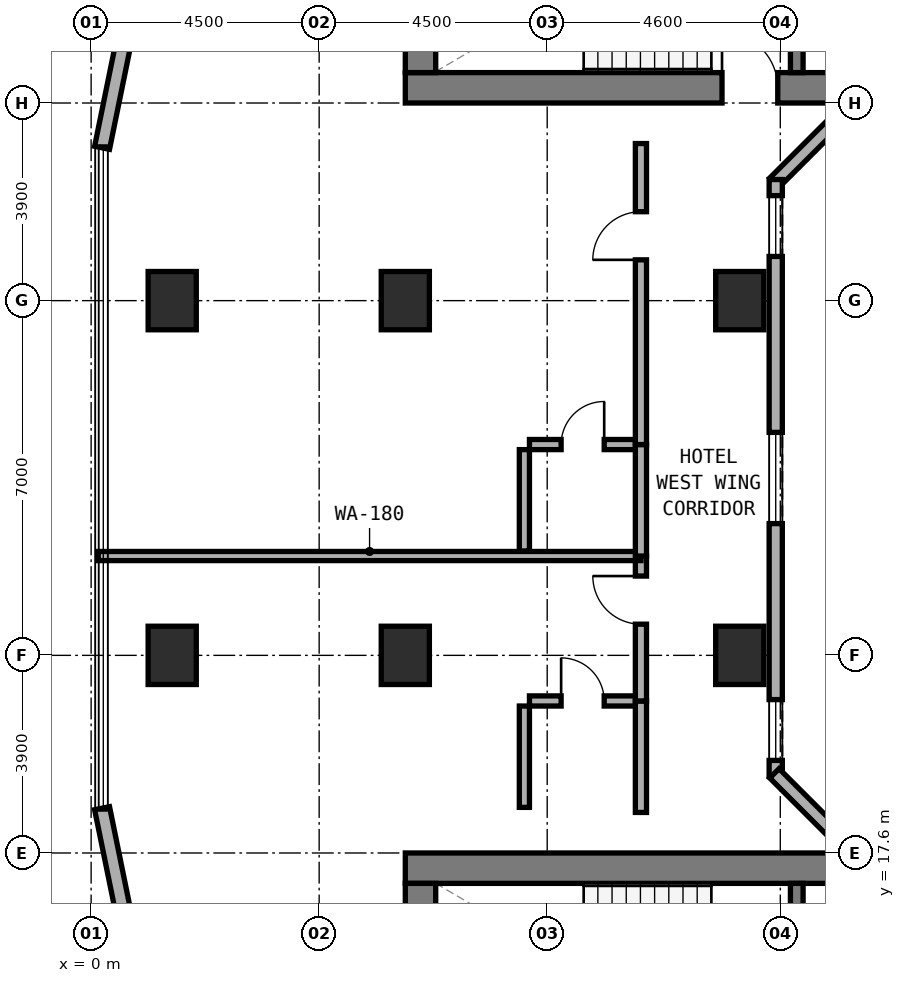
"""IFC4 building model, lengths in metres.
Left out: names, types, materials, properties, quantities, classifications, styles, units other than length and angle.
Written with IfcOpenShell. Run it as: python <this file> out.ifc"""

import sys

from ifc_helpers import new_model, si_unit, direction, frame, frame_2d, origin, origin_2d, place, context, subcontext, project, spatial, rectangle, extrude, element, fill, save


model = new_model("IFC4")
c1 = context("Model", 3, precision=1e-05, world=origin(), true_north=direction((0.0, 1.0)))
c2 = subcontext(c1, "Body", "Model", "MODEL_VIEW")
j1 = project(units=[si_unit("LENGTHUNIT", "METRE"), si_unit("PLANEANGLEUNIT", "RADIAN")], contexts=[c1])
p1 = place(None, origin())
s1 = spatial("IfcSite", under=j1, at=p1, CompositionType="ELEMENT")
p2 = place(p1, origin())
s2 = spatial("IfcBuilding", under=s1, at=p2, CompositionType="ELEMENT")
p3 = place(p2, frame((0.0, 0.0, 24.0)))
s3 = spatial("IfcBuildingStorey", under=s2, at=p3, CompositionType="ELEMENT", Elevation=24.0)
p4 = place(p3, frame((6.2, 32.7, 0.0), z_axis=(0.0, 0.0, 1.0), x_axis=(1.0, 0.0, 0.0)))
e1 = element("IfcWall", 1, at=p4, inside=s3, PredefinedType="SHEAR", context=c2, shape_type="SweptSolid", body=[
    extrude(rectangle(XDim=24.8, YDim=0.6, at=frame_2d((12.4, 0.0))), origin(), (0.0, 0.0, 1.0), 3.5),
])
p5 = place(p4, frame((6.25, 0.0, 0.0)))
e2 = element("IfcOpeningElement", 2, at=p5, cuts=e1, PredefinedType="OPENING", context=c2, shape_type="SweptSolid", body=[
    extrude(rectangle(XDim=1.1, YDim=2.15, at=frame_2d((0.55, 1.075))), frame((0.0, 0.31, 0.0), z_axis=(0.0, -1.0, 0.0), x_axis=(1.0, 0.0, 0.0)), (0.0, 0.0, 1.0), 0.62),
])
p6 = place(p3, frame((6.5, 33.0, 0.0), z_axis=(0.0, 0.0, 1.0), x_axis=(0.0, 1.0, 0.0)))
e3 = element("IfcWall", 3, at=p6, inside=s3, PredefinedType="SHEAR", context=c2, shape_type="SweptSolid", body=[
    extrude(rectangle(XDim=3.16, YDim=0.6, at=frame_2d((1.58, 0.0))), origin(), (0.0, 0.0, 1.0), 3.5),
])
p7 = place(p3, frame((13.925, 33.0, 0.0), z_axis=(0.0, 0.0, 1.0), x_axis=(0.0, 1.0, 0.0)))
e4 = element("IfcWall", 4, at=p7, inside=s3, PredefinedType="STANDARD", context=c2, shape_type="SweptSolid", body=[
    extrude(rectangle(XDim=3.16, YDim=0.25, at=frame_2d((1.58, 0.0))), origin(), (0.0, 0.0, 1.0), 3.22),
])
p8 = place(p7, frame((0.98, 0.0, 0.0)))
e5 = element("IfcOpeningElement", 5, at=p8, cuts=e4, PredefinedType="OPENING", context=c2, shape_type="SweptSolid", body=[
    extrude(rectangle(XDim=1.1, YDim=2.15, at=frame_2d((0.55, 1.075))), frame((0.0, 0.135, 0.0), z_axis=(0.0, -1.0, 0.0), x_axis=(1.0, 0.0, 0.0)), (0.0, 0.0, 1.0), 0.27),
])
p9 = place(p3, frame((6.2, 17.3, 0.0), z_axis=(0.0, 0.0, 1.0), x_axis=(1.0, 0.0, 0.0)))
e6 = element("IfcWall", 6, at=p9, inside=s3, PredefinedType="SHEAR", context=c2, shape_type="SweptSolid", body=[
    extrude(rectangle(XDim=24.8, YDim=0.6, at=frame_2d((12.4, 0.0))), origin(), (0.0, 0.0, 1.0), 3.5),
])
p10 = place(p3, frame((6.5, 13.84, 0.0), z_axis=(0.0, 0.0, 1.0), x_axis=(0.0, 1.0, 0.0)))
e7 = element("IfcWall", 7, at=p10, inside=s3, PredefinedType="SHEAR", context=c2, shape_type="SweptSolid", body=[
    extrude(rectangle(XDim=3.16, YDim=0.6, at=frame_2d((1.58, 0.0))), origin(), (0.0, 0.0, 1.0), 3.5),
])
p11 = place(p3, frame((13.925, 13.84, 0.0), z_axis=(0.0, 0.0, 1.0), x_axis=(0.0, 1.0, 0.0)))
e8 = element("IfcWall", 8, at=p11, inside=s3, PredefinedType="STANDARD", context=c2, shape_type="SweptSolid", body=[
    extrude(rectangle(XDim=3.16, YDim=0.25, at=frame_2d((1.58, 0.0))), origin(), (0.0, 0.0, 1.0), 3.22),
])
p12 = place(p11, frame((0.98, 0.0, 0.0)))
e9 = element("IfcOpeningElement", 9, at=p12, cuts=e8, PredefinedType="OPENING", context=c2, shape_type="SweptSolid", body=[
    extrude(rectangle(XDim=1.1, YDim=2.15, at=frame_2d((0.55, 1.075))), frame((0.0, 0.135, 0.0), z_axis=(0.0, -1.0, 0.0), x_axis=(1.0, 0.0, 0.0)), (0.0, 0.0, 1.0), 0.27),
])
for number, where, z_axis, x_axis in (
    (10, (6.2, 21.5, 0.0), (0.0, 0.0, 1.0), (1.0, 0.0, 0.0)),
    (11, (6.2, 28.5, 0.0), (0.0, 0.0, 1.0), (1.0, 0.0, 0.0)),
    (12, (12.8, 21.5, 0.0), (0.0, 0.0, 1.0), (1.0, 0.0, 0.0)),
    (13, (12.8, 28.5, 0.0), (0.0, 0.0, 1.0), (1.0, 0.0, 0.0)),
    (14, (1.6, 21.5, 0.0), (0.0, 0.0, 1.0), (1.0, 0.0, 0.0)),
    (15, (1.6, 28.5, 0.0), (0.0, 0.0, 1.0), (1.0, 0.0, 0.0)),
):
    element("IfcColumn", number, at=place(p3, frame(where, z_axis=z_axis, x_axis=x_axis)), inside=s3, PredefinedType="COLUMN", context=c2, shape_type="SweptSolid", body=[
        extrude(rectangle(XDim=0.95, YDim=1.15, at=origin_2d()), origin(), (0.0, 0.0, 1.0), 3.5),
    ])
p13 = place(p3, frame((2.229, 41.378, 0.0), z_axis=(0.0, 0.0, 1.0), x_axis=(-0.199990901713, -0.979797754249, 0.0)))
e16 = element("IfcWall", 16, at=p13, inside=s3, PredefinedType="STANDARD", context=c2, shape_type="SweptSolid", body=[
    extrude(rectangle(XDim=10.065, YDim=0.3, at=frame_2d((5.033, 0.0))), origin(), (0.0, 0.0, 1.0), 3.22),
])
p14 = place(p13, frame((0.378, 0.0, 0.85)))
e17 = element("IfcOpeningElement", 17, at=p14, cuts=e16, PredefinedType="OPENING", context=c2, shape_type="SweptSolid", body=[
    extrude(rectangle(XDim=1.8, YDim=1.5, at=frame_2d((0.9, 0.75))), frame((0.0, 0.16, 0.0), z_axis=(0.0, -1.0, 0.0), x_axis=(1.0, 0.0, 0.0)), (0.0, 0.0, 1.0), 0.32),
])
p15 = place(p13, frame((5.236, 0.0, 0.8)))
e18 = element("IfcOpeningElement", 18, at=p15, cuts=e16, PredefinedType="OPENING", context=c2, shape_type="SweptSolid", body=[
    extrude(rectangle(XDim=2.4, YDim=1.6, at=frame_2d((1.2, 0.8))), frame((0.0, 0.16, 0.0), z_axis=(0.0, -1.0, 0.0), x_axis=(1.0, 0.0, 0.0)), (0.0, 0.0, 1.0), 0.32),
])
p16 = place(p3, frame((0.216, 18.484, 0.0), z_axis=(0.0, 0.0, 1.0), x_axis=(0.199990901713, -0.979797754249, 0.0)))
e19 = element("IfcWall", 19, at=p16, inside=s3, PredefinedType="STANDARD", context=c2, shape_type="SweptSolid", body=[
    extrude(rectangle(XDim=10.065, YDim=0.3, at=frame_2d((5.033, 0.0))), origin(), (0.0, 0.0, 1.0), 3.22),
])
p17 = place(p16, frame((2.429, 0.0, 0.8)))
e20 = element("IfcOpeningElement", 20, at=p17, cuts=e19, PredefinedType="OPENING", context=c2, shape_type="SweptSolid", body=[
    extrude(rectangle(XDim=2.4, YDim=1.6, at=frame_2d((1.2, 0.8))), frame((0.0, 0.16, 0.0), z_axis=(0.0, -1.0, 0.0), x_axis=(1.0, 0.0, 0.0)), (0.0, 0.0, 1.0), 0.32),
])
p18 = place(p16, frame((7.887, 0.0, 0.85)))
e21 = element("IfcOpeningElement", 21, at=p18, cuts=e19, PredefinedType="OPENING", context=c2, shape_type="SweptSolid", body=[
    extrude(rectangle(XDim=1.8, YDim=1.5, at=frame_2d((0.9, 0.75))), frame((0.0, 0.16, 0.0), z_axis=(0.0, -1.0, 0.0), x_axis=(1.0, 0.0, 0.0)), (0.0, 0.0, 1.0), 0.32),
])
p19 = place(p3, frame((15.318, 32.662, 0.0), z_axis=(0.0, 0.0, 1.0), x_axis=(-0.707106781187, -0.707106781187, 0.0)))
e22 = element("IfcWall", 22, at=p19, inside=s3, PredefinedType="STANDARD", context=c2, shape_type="SweptSolid", body=[
    extrude(rectangle(XDim=2.594, YDim=0.26, at=frame_2d((1.297, 0.0))), origin(), (0.0, 0.0, 1.0), 3.22),
])
p20 = place(p3, frame((13.51, 30.89, 0.0), z_axis=(0.0, 0.0, 1.0), x_axis=(0.0, -1.0, 0.0)))
e23 = element("IfcWall", 23, at=p20, inside=s3, PredefinedType="STANDARD", context=c2, shape_type="SweptSolid", body=[
    extrude(rectangle(XDim=11.78, YDim=0.26, at=frame_2d((5.89, 0.0))), origin(), (0.0, 0.0, 1.0), 3.22),
])
p21 = place(p20, frame((0.318, 0.0, 0.85)))
e24 = element("IfcOpeningElement", 24, at=p21, cuts=e23, PredefinedType="OPENING", context=c2, shape_type="SweptSolid", body=[
    extrude(rectangle(XDim=1.2, YDim=1.5, at=frame_2d((0.6, 0.75))), frame((0.0, 0.14, 0.0), z_axis=(0.0, -1.0, 0.0), x_axis=(1.0, 0.0, 0.0)), (0.0, 0.0, 1.0), 0.28),
])
p22 = place(p20, frame((4.99, 0.0, 0.85)))
e25 = element("IfcOpeningElement", 25, at=p22, cuts=e23, PredefinedType="OPENING", context=c2, shape_type="SweptSolid", body=[
    extrude(rectangle(XDim=1.8, YDim=1.5, at=frame_2d((0.9, 0.75))), frame((0.0, 0.14, 0.0), z_axis=(0.0, -1.0, 0.0), x_axis=(1.0, 0.0, 0.0)), (0.0, 0.0, 1.0), 0.28),
])
p23 = place(p20, frame((10.263, 0.0, 0.85)))
e26 = element("IfcOpeningElement", 26, at=p23, cuts=e23, PredefinedType="OPENING", context=c2, shape_type="SweptSolid", body=[
    extrude(rectangle(XDim=1.2, YDim=1.5, at=frame_2d((0.6, 0.75))), frame((0.0, 0.14, 0.0), z_axis=(0.0, -1.0, 0.0), x_axis=(1.0, 0.0, 0.0)), (0.0, 0.0, 1.0), 0.28),
])
p24 = place(p3, frame((13.484, 19.172, 0.0), z_axis=(0.0, 0.0, 1.0), x_axis=(0.707106781187, -0.707106781187, 0.0)))
e27 = element("IfcWall", 27, at=p24, inside=s3, PredefinedType="STANDARD", context=c2, shape_type="SweptSolid", body=[
    extrude(rectangle(XDim=2.594, YDim=0.26, at=frame_2d((1.297, 0.0))), origin(), (0.0, 0.0, 1.0), 3.22),
])
p25 = place(p3, frame((8.65, 20.6, 0.0), z_axis=(0.0, 0.0, 1.0), x_axis=(1.0, 0.0, 0.0)))
e28 = element("IfcWall", 28, at=p25, inside=s3, PredefinedType="PLUMBINGWALL", context=c2, shape_type="SweptSolid", body=[
    extrude(rectangle(XDim=2.1, YDim=0.2, at=frame_2d((1.05, 0.0))), origin(), (0.0, 0.0, 1.0), 3.22),
])
p26 = place(p25, frame((0.625, 0.0, 0.0)))
e29 = element("IfcOpeningElement", 29, at=p26, cuts=e28, PredefinedType="OPENING", context=c2, shape_type="SweptSolid", body=[
    extrude(rectangle(XDim=0.85, YDim=2.1, at=frame_2d((0.425, 1.05))), frame((0.0, 0.11, 0.0), z_axis=(0.0, -1.0, 0.0), x_axis=(1.0, 0.0, 0.0)), (0.0, 0.0, 1.0), 0.22),
])
p27 = place(p3, frame((8.55, 18.5, 0.0), z_axis=(0.0, 0.0, 1.0), x_axis=(0.0, 1.0, 0.0)))
e30 = element("IfcWall", 30, at=p27, inside=s3, PredefinedType="PLUMBINGWALL", context=c2, shape_type="SweptSolid", body=[
    extrude(rectangle(XDim=2.0, YDim=0.2, at=frame_2d((1.0, 0.0))), origin(), (0.0, 0.0, 1.0), 3.22),
])
p28 = place(p3, frame((10.85, 18.4, 0.0), z_axis=(0.0, 0.0, 1.0), x_axis=(0.0, 1.0, 0.0)))
e31 = element("IfcWall", 31, at=p28, inside=s3, PredefinedType="SOLIDWALL", context=c2, shape_type="SweptSolid", body=[
    extrude(rectangle(XDim=2.2, YDim=0.22, at=frame_2d((1.1, 0.0))), origin(), (0.0, 0.0, 1.0), 3.22),
])
p29 = place(p3, frame((10.85, 20.6, 0.0), z_axis=(0.0, 0.0, 1.0), x_axis=(0.0, 1.0, 0.0)))
e32 = element("IfcWall", 32, at=p29, inside=s3, PredefinedType="SOLIDWALL", context=c2, shape_type="SweptSolid", body=[
    extrude(rectangle(XDim=2.86, YDim=0.22, at=frame_2d((1.43, 0.0))), origin(), (0.0, 0.0, 1.0), 2.295),
])
p30 = place(p29, frame((1.515, 0.0, 0.0)))
e33 = element("IfcOpeningElement", 33, at=p30, cuts=e32, PredefinedType="OPENING", context=c2, shape_type="SweptSolid", body=[
    extrude(rectangle(XDim=0.95, YDim=2.1, at=frame_2d((0.475, 1.05))), frame((0.0, 0.12, 0.0), z_axis=(0.0, -1.0, 0.0), x_axis=(1.0, 0.0, 0.0)), (0.0, 0.0, 1.0), 0.24),
])
p31 = place(p3, frame((0.14, 23.46, 0.0), z_axis=(0.0, 0.0, 1.0), x_axis=(1.0, 0.0, 0.0)))
e34 = element("IfcWall", 34, at=p31, inside=s3, PredefinedType="SOLIDWALL", context=c2, shape_type="SweptSolid", body=[
    extrude(rectangle(XDim=10.71, YDim=0.18, at=frame_2d((5.355, 0.0))), origin(), (0.0, 0.0, 1.0), 2.745),
])
p32 = place(p3, frame((8.65, 25.66, 0.0), z_axis=(0.0, 0.0, 1.0), x_axis=(1.0, 0.0, 0.0)))
e35 = element("IfcWall", 35, at=p32, inside=s3, PredefinedType="PLUMBINGWALL", context=c2, shape_type="SweptSolid", body=[
    extrude(rectangle(XDim=2.1, YDim=0.2, at=frame_2d((1.05, 0.0))), origin(), (0.0, 0.0, 1.0), 3.22),
])
p33 = place(p32, frame((0.625, 0.0, 0.0)))
e36 = element("IfcOpeningElement", 36, at=p33, cuts=e35, PredefinedType="OPENING", context=c2, shape_type="SweptSolid", body=[
    extrude(rectangle(XDim=0.85, YDim=2.1, at=frame_2d((0.425, 1.05))), frame((0.0, 0.11, 0.0), z_axis=(0.0, -1.0, 0.0), x_axis=(1.0, 0.0, 0.0)), (0.0, 0.0, 1.0), 0.22),
])
p34 = place(p3, frame((8.55, 23.56, 0.0), z_axis=(0.0, 0.0, 1.0), x_axis=(0.0, 1.0, 0.0)))
e37 = element("IfcWall", 37, at=p34, inside=s3, PredefinedType="PLUMBINGWALL", context=c2, shape_type="SweptSolid", body=[
    extrude(rectangle(XDim=2.0, YDim=0.2, at=frame_2d((1.0, 0.0))), origin(), (0.0, 0.0, 1.0), 3.22),
])
p35 = place(p3, frame((10.85, 23.46, 0.0), z_axis=(0.0, 0.0, 1.0), x_axis=(0.0, 1.0, 0.0)))
e38 = element("IfcWall", 38, at=p35, inside=s3, PredefinedType="SOLIDWALL", context=c2, shape_type="SweptSolid", body=[
    extrude(rectangle(XDim=2.2, YDim=0.22, at=frame_2d((1.1, 0.0))), origin(), (0.0, 0.0, 1.0), 3.22),
])
p36 = place(p3, frame((10.85, 25.66, 0.0), z_axis=(0.0, 0.0, 1.0), x_axis=(0.0, 1.0, 0.0)))
e39 = element("IfcWall", 39, at=p36, inside=s3, PredefinedType="SOLIDWALL", context=c2, shape_type="SweptSolid", body=[
    extrude(rectangle(XDim=5.94, YDim=0.22, at=frame_2d((2.97, 0.0))), origin(), (0.0, 0.0, 1.0), 2.295),
])
p37 = place(p36, frame((3.645, 0.0, 0.0)))
e40 = element("IfcOpeningElement", 40, at=p37, cuts=e39, PredefinedType="OPENING", context=c2, shape_type="SweptSolid", body=[
    extrude(rectangle(XDim=0.95, YDim=2.1, at=frame_2d((0.475, 1.05))), frame((0.0, 0.12, 0.0), z_axis=(0.0, -1.0, 0.0), x_axis=(1.0, 0.0, 0.0)), (0.0, 0.0, 1.0), 0.24),
])
p38 = place(p21, origin())
e41 = element("IfcWindow", 41, at=p38, inside=s3, PartitioningType="SINGLE_PANEL", PredefinedType="WINDOW", context=c2, shape_type="SweptSolid", body=[
    extrude(rectangle(XDim=1.2, YDim=1.5, at=frame_2d((0.6, 0.75))), frame((0.0, 0.03, 0.0), z_axis=(0.0, -1.0, 0.0), x_axis=(1.0, 0.0, 0.0)), (0.0, 0.0, 1.0), 0.06),
])
fill(e24, e41)
p39 = place(p22, origin())
e42 = element("IfcWindow", 42, at=p39, inside=s3, PartitioningType="SINGLE_PANEL", PredefinedType="WINDOW", context=c2, shape_type="SweptSolid", body=[
    extrude(rectangle(XDim=1.8, YDim=1.5, at=frame_2d((0.9, 0.75))), frame((0.0, 0.03, 0.0), z_axis=(0.0, -1.0, 0.0), x_axis=(1.0, 0.0, 0.0)), (0.0, 0.0, 1.0), 0.06),
])
fill(e25, e42)
p40 = place(p23, origin())
e43 = element("IfcWindow", 43, at=p40, inside=s3, PartitioningType="SINGLE_PANEL", PredefinedType="WINDOW", context=c2, shape_type="SweptSolid", body=[
    extrude(rectangle(XDim=1.2, YDim=1.5, at=frame_2d((0.6, 0.75))), frame((0.0, 0.03, 0.0), z_axis=(0.0, -1.0, 0.0), x_axis=(1.0, 0.0, 0.0)), (0.0, 0.0, 1.0), 0.06),
])
fill(e26, e43)
p41 = place(p5, origin())
e44 = element("IfcDoor", 44, at=p41, inside=s3, OperationType="SINGLE_SWING_LEFT", PredefinedType="DOOR", context=c2, shape_type="SweptSolid", body=[
    extrude(rectangle(XDim=1.1, YDim=2.15, at=frame_2d((0.55, 1.075))), frame((0.0, 0.025, 0.0), z_axis=(0.0, -1.0, 0.0), x_axis=(1.0, 0.0, 0.0)), (0.0, 0.0, 1.0), 0.05),
])
fill(e2, e44)
p42 = place(p26, origin())
e45 = element("IfcDoor", 45, at=p42, inside=s3, OperationType="SINGLE_SWING_LEFT", PredefinedType="DOOR", context=c2, shape_type="SweptSolid", body=[
    extrude(rectangle(XDim=0.85, YDim=2.1, at=frame_2d((0.425, 1.05))), frame((0.0, 0.025, 0.0), z_axis=(0.0, -1.0, 0.0), x_axis=(1.0, 0.0, 0.0)), (0.0, 0.0, 1.0), 0.05),
])
fill(e29, e45)
p43 = place(p30, origin())
e46 = element("IfcDoor", 46, at=p43, inside=s3, OperationType="SINGLE_SWING_RIGHT", PredefinedType="DOOR", context=c2, shape_type="SweptSolid", body=[
    extrude(rectangle(XDim=0.95, YDim=2.1, at=frame_2d((0.475, 1.05))), frame((0.0, 0.025, 0.0), z_axis=(0.0, -1.0, 0.0), x_axis=(1.0, 0.0, 0.0)), (0.0, 0.0, 1.0), 0.05),
])
fill(e33, e46)
p44 = place(p33, origin())
e47 = element("IfcDoor", 47, at=p44, inside=s3, OperationType="SINGLE_SWING_RIGHT", PredefinedType="DOOR", context=c2, shape_type="SweptSolid", body=[
    extrude(rectangle(XDim=0.85, YDim=2.1, at=frame_2d((0.425, 1.05))), frame((0.0, 0.025, 0.0), z_axis=(0.0, -1.0, 0.0), x_axis=(1.0, 0.0, 0.0)), (0.0, 0.0, 1.0), 0.05),
])
fill(e36, e47)
p45 = place(p37, origin())
e48 = element("IfcDoor", 48, at=p45, inside=s3, OperationType="SINGLE_SWING_LEFT", PredefinedType="DOOR", context=c2, shape_type="SweptSolid", body=[
    extrude(rectangle(XDim=0.95, YDim=2.1, at=frame_2d((0.475, 1.05))), frame((0.0, 0.025, 0.0), z_axis=(0.0, -1.0, 0.0), x_axis=(1.0, 0.0, 0.0)), (0.0, 0.0, 1.0), 0.05),
])
fill(e40, e48)
save(model, sys.argv[1])
